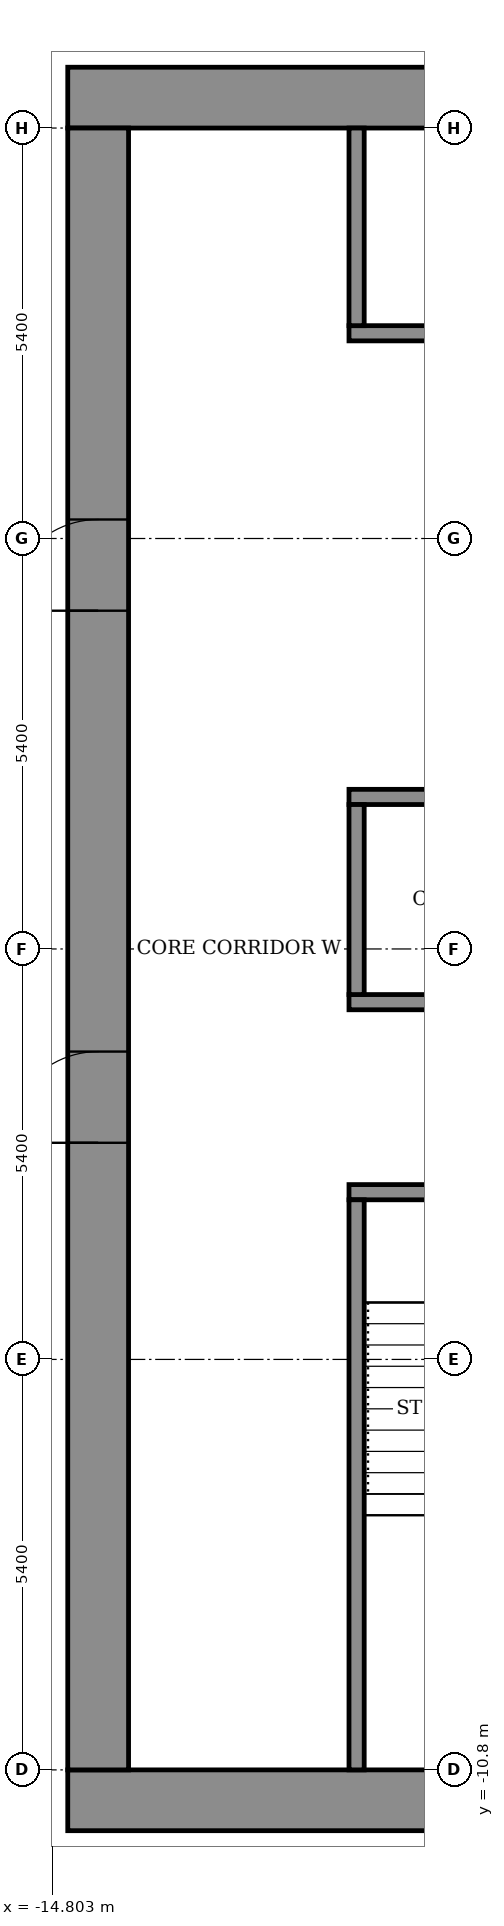
"""IFC4 building model, lengths in metres.
Left out: names, types, materials, properties, quantities, classifications, styles, units other than length and angle.
Written with IfcOpenShell. Run it as: python <this file> out.ifc"""

import sys

from ifc_helpers import new_model, si_unit, direction, frame, frame_2d, origin, place, context, subcontext, project, spatial, rectangle, extrude, element, fill, save


model = new_model("IFC4")
c1 = context("Model", 3, precision=1e-05, world=origin(), true_north=direction((0.0, 1.0)))
c2 = subcontext(c1, "Body", "Model", "MODEL_VIEW")
j1 = project(units=[si_unit("LENGTHUNIT", "METRE"), si_unit("PLANEANGLEUNIT", "RADIAN")], contexts=[c1])
p1 = place(None, origin())
s1 = spatial("IfcSite", under=j1, at=p1, CompositionType="ELEMENT")
p2 = place(p1, origin())
s2 = spatial("IfcBuilding", under=s1, at=p2, CompositionType="ELEMENT")
p3 = place(p2, frame((0.0, 0.0, 249.1)))
s3 = spatial("IfcBuildingStorey", under=s2, at=p3, CompositionType="ELEMENT", Elevation=249.1)
for number, where, z_axis, x_axis in (
    (1, (-14.6, -11.2, 0.0), (0.0, 0.0, 1.0), (1.0, 0.0, 0.0)),
    (2, (-14.6, 11.2, 0.0), (0.0, 0.0, 1.0), (1.0, 0.0, 0.0)),
):
    element("IfcWall", number, at=place(p3, frame(where, z_axis=z_axis, x_axis=x_axis)), inside=s3, PredefinedType="SHEAR", context=c2, shape_type="SweptSolid", body=[
        extrude(rectangle(XDim=29.2, YDim=0.8, at=frame_2d((14.6, 0.0))), origin(), (0.0, 0.0, 1.0), 3.6),
    ])
p4 = place(p3, frame((-14.2, -10.8, 0.0), z_axis=(0.0, 0.0, 1.0), x_axis=(0.0, 1.0, 0.0)))
e3 = element("IfcWall", 3, at=p4, inside=s3, PredefinedType="SHEAR", context=c2, shape_type="SweptSolid", body=[
    extrude(rectangle(XDim=21.6, YDim=0.8, at=frame_2d((10.8, 0.0))), origin(), (0.0, 0.0, 1.0), 3.6),
])
p5 = place(p4, frame((8.25, 0.0, 0.0)))
e4 = element("IfcOpeningElement", 4, at=p5, cuts=e3, PredefinedType="OPENING", context=c2, shape_type="SweptSolid", body=[
    extrude(rectangle(XDim=1.2, YDim=2.1, at=frame_2d((0.6, 1.05))), frame((0.0, 0.41, 0.0), z_axis=(0.0, -1.0, 0.0), x_axis=(1.0, 0.0, 0.0)), (0.0, 0.0, 1.0), 0.82),
])
p6 = place(p4, frame((15.25, 0.0, 0.0)))
e5 = element("IfcOpeningElement", 5, at=p6, cuts=e3, PredefinedType="OPENING", context=c2, shape_type="SweptSolid", body=[
    extrude(rectangle(XDim=1.2, YDim=2.1, at=frame_2d((0.6, 1.05))), frame((0.0, 0.41, 0.0), z_axis=(0.0, -1.0, 0.0), x_axis=(1.0, 0.0, 0.0)), (0.0, 0.0, 1.0), 0.82),
])
p7 = place(p3, frame((-10.9, -3.2, 0.0), z_axis=(0.0, 0.0, 1.0), x_axis=(1.0, 0.0, 0.0)))
e6 = element("IfcWall", 6, at=p7, inside=s3, PredefinedType="SHEAR", context=c2, shape_type="SweptSolid", body=[
    extrude(rectangle(XDim=21.8, YDim=0.2, at=frame_2d((10.9, 0.0))), origin(), (0.0, 0.0, 1.0), 3.05),
])
p8 = place(p7, frame((1.075, 0.0, 0.0)))
e7 = element("IfcOpeningElement", 7, at=p8, cuts=e6, PredefinedType="OPENING", context=c2, shape_type="SweptSolid", body=[
    extrude(rectangle(XDim=1.1, YDim=2.1, at=frame_2d((0.55, 1.05))), frame((0.0, 0.11, 0.0), z_axis=(0.0, -1.0, 0.0), x_axis=(1.0, 0.0, 0.0)), (0.0, 0.0, 1.0), 0.22),
])
p9 = place(p7, frame((10.325, 0.0, 0.0)))
e8 = element("IfcOpeningElement", 8, at=p9, cuts=e6, PredefinedType="OPENING", context=c2, shape_type="SweptSolid", body=[
    extrude(rectangle(XDim=1.1, YDim=2.1, at=frame_2d((0.55, 1.05))), frame((0.0, 0.11, 0.0), z_axis=(0.0, -1.0, 0.0), x_axis=(1.0, 0.0, 0.0)), (0.0, 0.0, 1.0), 0.22),
])
p10 = place(p7, frame((19.625, 0.0, 0.0)))
e9 = element("IfcOpeningElement", 9, at=p10, cuts=e6, PredefinedType="OPENING", context=c2, shape_type="SweptSolid", body=[
    extrude(rectangle(XDim=1.1, YDim=2.1, at=frame_2d((0.55, 1.05))), frame((0.0, 0.11, 0.0), z_axis=(0.0, -1.0, 0.0), x_axis=(1.0, 0.0, 0.0)), (0.0, 0.0, 1.0), 0.22),
])
p11 = place(p7, frame((5.7, 0.0, 0.0)))
e10 = element("IfcOpeningElement", 10, at=p11, cuts=e6, PredefinedType="OPENING", context=c2, shape_type="SweptSolid", body=[
    extrude(rectangle(XDim=1.1, YDim=2.1, at=frame_2d((0.55, 1.05))), frame((0.0, 0.11, 0.0), z_axis=(0.0, -1.0, 0.0), x_axis=(1.0, 0.0, 0.0)), (0.0, 0.0, 1.0), 0.22),
])
p12 = place(p7, frame((14.975, 0.0, 0.0)))
e11 = element("IfcOpeningElement", 11, at=p12, cuts=e6, PredefinedType="OPENING", context=c2, shape_type="SweptSolid", body=[
    extrude(rectangle(XDim=1.1, YDim=2.1, at=frame_2d((0.55, 1.05))), frame((0.0, 0.11, 0.0), z_axis=(0.0, -1.0, 0.0), x_axis=(1.0, 0.0, 0.0)), (0.0, 0.0, 1.0), 0.22),
])
p13 = place(p3, frame((-10.9, -0.7, 0.0), z_axis=(0.0, 0.0, 1.0), x_axis=(1.0, 0.0, 0.0)))
e12 = element("IfcWall", 12, at=p13, inside=s3, PredefinedType="SHEAR", context=c2, shape_type="SweptSolid", body=[
    extrude(rectangle(XDim=21.8, YDim=0.2, at=frame_2d((10.9, 0.0))), origin(), (0.0, 0.0, 1.0), 3.05),
])
p14 = place(p3, frame((-10.9, 2.0, 0.0), z_axis=(0.0, 0.0, 1.0), x_axis=(1.0, 0.0, 0.0)))
e13 = element("IfcWall", 13, at=p14, inside=s3, PredefinedType="SHEAR", context=c2, shape_type="SweptSolid", body=[
    extrude(rectangle(XDim=21.8, YDim=0.2, at=frame_2d((10.9, 0.0))), origin(), (0.0, 0.0, 1.0), 3.05),
])
p15 = place(p14, frame((4.95, 0.0, 0.0)))
e14 = element("IfcOpeningElement", 14, at=p15, cuts=e13, PredefinedType="OPENING", context=c2, shape_type="SweptSolid", body=[
    extrude(rectangle(XDim=1.1, YDim=2.1, at=frame_2d((0.55, 1.05))), frame((0.0, 0.11, 0.0), z_axis=(0.0, -1.0, 0.0), x_axis=(1.0, 0.0, 0.0)), (0.0, 0.0, 1.0), 0.22),
])
p16 = place(p14, frame((7.65, 0.0, 0.0)))
e15 = element("IfcOpeningElement", 15, at=p16, cuts=e13, PredefinedType="OPENING", context=c2, shape_type="SweptSolid", body=[
    extrude(rectangle(XDim=1.1, YDim=2.1, at=frame_2d((0.55, 1.05))), frame((0.0, 0.11, 0.0), z_axis=(0.0, -1.0, 0.0), x_axis=(1.0, 0.0, 0.0)), (0.0, 0.0, 1.0), 0.22),
])
p17 = place(p14, frame((10.35, 0.0, 0.0)))
e16 = element("IfcOpeningElement", 16, at=p17, cuts=e13, PredefinedType="OPENING", context=c2, shape_type="SweptSolid", body=[
    extrude(rectangle(XDim=1.1, YDim=2.1, at=frame_2d((0.55, 1.05))), frame((0.0, 0.11, 0.0), z_axis=(0.0, -1.0, 0.0), x_axis=(1.0, 0.0, 0.0)), (0.0, 0.0, 1.0), 0.22),
])
p18 = place(p14, frame((1.675, 0.0, 0.0)))
e17 = element("IfcOpeningElement", 17, at=p18, cuts=e13, PredefinedType="OPENING", context=c2, shape_type="SweptSolid", body=[
    extrude(rectangle(XDim=0.9, YDim=2.1, at=frame_2d((0.45, 1.05))), frame((0.0, 0.11, 0.0), z_axis=(0.0, -1.0, 0.0), x_axis=(1.0, 0.0, 0.0)), (0.0, 0.0, 1.0), 0.22),
])
p19 = place(p14, frame((14.5, 0.0, 0.0)))
e18 = element("IfcOpeningElement", 18, at=p19, cuts=e13, PredefinedType="OPENING", context=c2, shape_type="SweptSolid", body=[
    extrude(rectangle(XDim=0.9, YDim=2.1, at=frame_2d((0.45, 1.05))), frame((0.0, 0.11, 0.0), z_axis=(0.0, -1.0, 0.0), x_axis=(1.0, 0.0, 0.0)), (0.0, 0.0, 1.0), 0.22),
])
p20 = place(p14, frame((19.225, 0.0, 0.0)))
e19 = element("IfcOpeningElement", 19, at=p20, cuts=e13, PredefinedType="OPENING", context=c2, shape_type="SweptSolid", body=[
    extrude(rectangle(XDim=0.9, YDim=2.1, at=frame_2d((0.45, 1.05))), frame((0.0, 0.11, 0.0), z_axis=(0.0, -1.0, 0.0), x_axis=(1.0, 0.0, 0.0)), (0.0, 0.0, 1.0), 0.22),
])
p21 = place(p3, frame((-10.9, 8.1, 0.0), z_axis=(0.0, 0.0, 1.0), x_axis=(1.0, 0.0, 0.0)))
e20 = element("IfcWall", 20, at=p21, inside=s3, PredefinedType="SHEAR", context=c2, shape_type="SweptSolid", body=[
    extrude(rectangle(XDim=21.8, YDim=0.2, at=frame_2d((10.9, 0.0))), origin(), (0.0, 0.0, 1.0), 3.05),
])
p22 = place(p21, frame((4.95, 0.0, 0.0)))
e21 = element("IfcOpeningElement", 21, at=p22, cuts=e20, PredefinedType="OPENING", context=c2, shape_type="SweptSolid", body=[
    extrude(rectangle(XDim=1.1, YDim=2.1, at=frame_2d((0.55, 1.05))), frame((0.0, 0.11, 0.0), z_axis=(0.0, -1.0, 0.0), x_axis=(1.0, 0.0, 0.0)), (0.0, 0.0, 1.0), 0.22),
])
p23 = place(p21, frame((7.65, 0.0, 0.0)))
e22 = element("IfcOpeningElement", 22, at=p23, cuts=e20, PredefinedType="OPENING", context=c2, shape_type="SweptSolid", body=[
    extrude(rectangle(XDim=1.1, YDim=2.1, at=frame_2d((0.55, 1.05))), frame((0.0, 0.11, 0.0), z_axis=(0.0, -1.0, 0.0), x_axis=(1.0, 0.0, 0.0)), (0.0, 0.0, 1.0), 0.22),
])
p24 = place(p21, frame((10.35, 0.0, 0.0)))
e23 = element("IfcOpeningElement", 23, at=p24, cuts=e20, PredefinedType="OPENING", context=c2, shape_type="SweptSolid", body=[
    extrude(rectangle(XDim=1.1, YDim=2.1, at=frame_2d((0.55, 1.05))), frame((0.0, 0.11, 0.0), z_axis=(0.0, -1.0, 0.0), x_axis=(1.0, 0.0, 0.0)), (0.0, 0.0, 1.0), 0.22),
])
p25 = place(p21, frame((1.675, 0.0, 0.0)))
e24 = element("IfcOpeningElement", 24, at=p25, cuts=e20, PredefinedType="OPENING", context=c2, shape_type="SweptSolid", body=[
    extrude(rectangle(XDim=0.9, YDim=2.1, at=frame_2d((0.45, 1.05))), frame((0.0, 0.11, 0.0), z_axis=(0.0, -1.0, 0.0), x_axis=(1.0, 0.0, 0.0)), (0.0, 0.0, 1.0), 0.22),
])
p26 = place(p21, frame((14.5, 0.0, 0.0)))
e25 = element("IfcOpeningElement", 25, at=p26, cuts=e20, PredefinedType="OPENING", context=c2, shape_type="SweptSolid", body=[
    extrude(rectangle(XDim=0.9, YDim=2.1, at=frame_2d((0.45, 1.05))), frame((0.0, 0.11, 0.0), z_axis=(0.0, -1.0, 0.0), x_axis=(1.0, 0.0, 0.0)), (0.0, 0.0, 1.0), 0.22),
])
p27 = place(p21, frame((19.225, 0.0, 0.0)))
e26 = element("IfcOpeningElement", 26, at=p27, cuts=e20, PredefinedType="OPENING", context=c2, shape_type="SweptSolid", body=[
    extrude(rectangle(XDim=0.9, YDim=2.1, at=frame_2d((0.45, 1.05))), frame((0.0, 0.11, 0.0), z_axis=(0.0, -1.0, 0.0), x_axis=(1.0, 0.0, 0.0)), (0.0, 0.0, 1.0), 0.22),
])
p28 = place(p3, frame((-10.8, -10.8, 0.0), z_axis=(0.0, 0.0, 1.0), x_axis=(0.0, 1.0, 0.0)))
e27 = element("IfcWall", 27, at=p28, inside=s3, PredefinedType="SHEAR", context=c2, shape_type="SweptSolid", body=[
    extrude(rectangle(XDim=7.5, YDim=0.2, at=frame_2d((3.75, 0.0))), origin(), (0.0, 0.0, 1.0), 3.05),
])
p29 = place(p3, frame((-10.8, -0.6, 0.0), z_axis=(0.0, 0.0, 1.0), x_axis=(0.0, 1.0, 0.0)))
e28 = element("IfcWall", 28, at=p29, inside=s3, PredefinedType="STANDARD", context=c2, shape_type="SweptSolid", body=[
    extrude(rectangle(XDim=2.5, YDim=0.2, at=frame_2d((1.25, 0.0))), origin(), (0.0, 0.0, 1.0), 3.05),
])
p30 = place(p3, frame((-10.8, 8.2, 0.0), z_axis=(0.0, 0.0, 1.0), x_axis=(0.0, 1.0, 0.0)))
e29 = element("IfcWall", 29, at=p30, inside=s3, PredefinedType="STANDARD", context=c2, shape_type="SweptSolid", body=[
    extrude(rectangle(XDim=2.6, YDim=0.2, at=frame_2d((1.3, 0.0))), origin(), (0.0, 0.0, 1.0), 3.05),
])
p31 = place(p5, origin())
e30 = element("IfcDoor", 30, at=p31, inside=s3, OperationType="DOUBLE_DOOR_SINGLE_SWING", PredefinedType="DOOR", context=c2, shape_type="SweptSolid", body=[
    extrude(rectangle(XDim=1.2, YDim=2.1, at=frame_2d((0.6, 1.05))), frame((0.0, 0.025, 0.0), z_axis=(0.0, -1.0, 0.0), x_axis=(1.0, 0.0, 0.0)), (0.0, 0.0, 1.0), 0.05),
])
fill(e4, e30)
p32 = place(p6, origin())
e31 = element("IfcDoor", 31, at=p32, inside=s3, OperationType="DOUBLE_DOOR_SINGLE_SWING", PredefinedType="DOOR", context=c2, shape_type="SweptSolid", body=[
    extrude(rectangle(XDim=1.2, YDim=2.1, at=frame_2d((0.6, 1.05))), frame((0.0, 0.025, 0.0), z_axis=(0.0, -1.0, 0.0), x_axis=(1.0, 0.0, 0.0)), (0.0, 0.0, 1.0), 0.05),
])
fill(e5, e31)
save(model, sys.argv[1])
